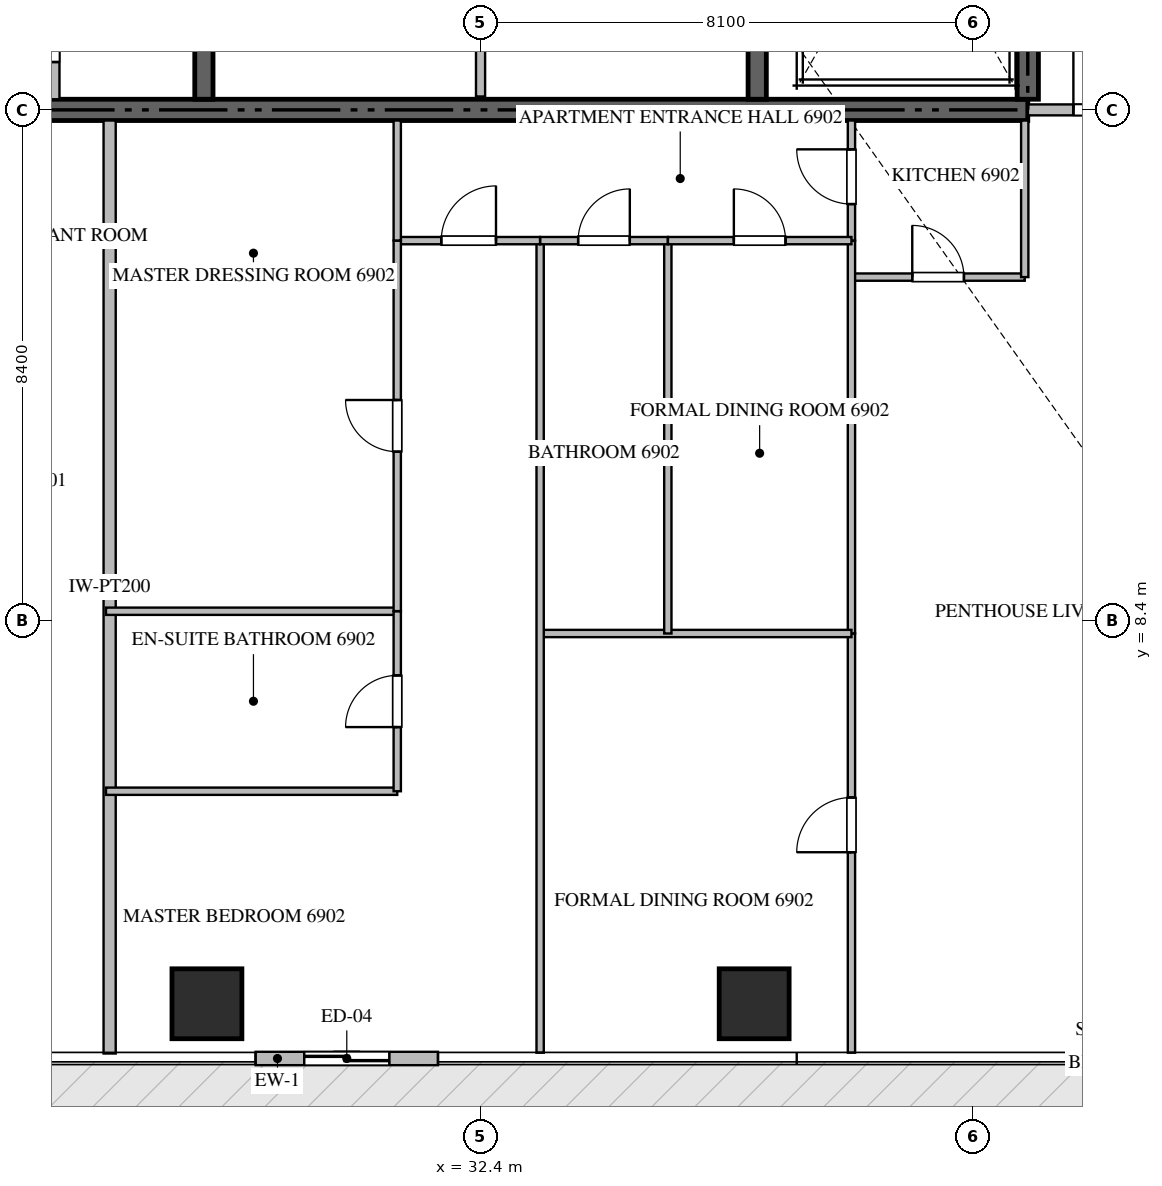
"""IFC4 building model, lengths in metres.
Left out: names, types, materials, properties, quantities, classifications, styles, units other than length and angle.
Written with IfcOpenShell. Run it as: python <this file> out.ifc"""

import sys

from ifc_helpers import new_model, si_unit, direction, frame, frame_2d, origin, origin_2d, place, context, subcontext, project, spatial, rectangle, extrude, source, transform, mapped, element, fill, save


model = new_model("IFC4")
c1 = context("Model", 3, precision=1e-05, world=origin(), true_north=direction((0.0, 1.0)))
c2 = subcontext(c1, "Body", "Model", "MODEL_VIEW")
j1 = project(units=[si_unit("LENGTHUNIT", "METRE"), si_unit("PLANEANGLEUNIT", "RADIAN")], contexts=[c1])
p1 = place(None, origin())
s1 = spatial("IfcSite", under=j1, at=p1, CompositionType="ELEMENT")
p2 = place(p1, origin())
s2 = spatial("IfcBuilding", under=s1, at=p2, CompositionType="ELEMENT")
p3 = place(p2, frame((0.0, 0.0, 275.9)))
s3 = spatial("IfcBuildingStorey", under=s2, at=p3, CompositionType="ELEMENT", Elevation=275.9)
p4 = place(p3, frame((23.4, 16.8, -0.26), z_axis=(0.0, 0.0, 1.0), x_axis=(1.0, 0.0, 0.0)))
e1 = element("IfcWall", 1, at=p4, inside=s3, PredefinedType="SHEAR", context=c2, shape_type="SweptSolid", body=[
    extrude(rectangle(XDim=18.0, YDim=0.35, at=frame_2d((9.0, 0.0))), origin(), (0.0, 0.0, 1.0), 3.848),
])
p5 = place(p3, frame((41.4, 16.975, -0.26), z_axis=(0.0, 0.0, 1.0), x_axis=(0.0, 1.0, 0.0)))
e2 = element("IfcWall", 2, at=p5, inside=s3, PredefinedType="SHEAR", context=c2, shape_type="SweptSolid", body=[
    extrude(rectangle(XDim=8.375, YDim=0.35, at=frame_2d((4.188, 0.0))), origin(), (0.0, 0.0, 1.0), 3.848),
])
p6 = place(p3, frame((27.85, 16.975, -0.26), z_axis=(0.0, 0.0, 1.0), x_axis=(0.0, 1.0, 0.0)))
e3 = element("IfcWall", 3, at=p6, inside=s3, PredefinedType="SHEAR", context=c2, shape_type="SweptSolid", body=[
    extrude(rectangle(XDim=4.875, YDim=0.3, at=frame_2d((2.438, 0.0))), origin(), (0.0, 0.0, 1.0), 3.848),
])
p7 = place(p3, frame((36.95, 16.975, -0.26), z_axis=(0.0, 0.0, 1.0), x_axis=(0.0, 1.0, 0.0)))
e4 = element("IfcWall", 4, at=p7, inside=s3, PredefinedType="SHEAR", context=c2, shape_type="SweptSolid", body=[
    extrude(rectangle(XDim=8.375, YDim=0.3, at=frame_2d((4.188, 0.0))), origin(), (0.0, 0.0, 1.0), 3.848),
])
m1 = source(origin(), c2, "Body", "SweptSolid", [
    extrude(rectangle(XDim=1.15, YDim=1.15, at=origin_2d()), origin(), (0.0, 0.0, 1.0), 3.85),
])
for number, where, z_axis, x_axis in (
    (5, (27.9, 2.1, -0.26), (0.0, 0.0, 1.0), (1.0, 0.0, 0.0)),
    (6, (36.9, 2.1, -0.26), (0.0, 0.0, 1.0), (1.0, 0.0, 0.0)),
):
    element("IfcColumn", number, at=place(p3, frame(where, z_axis=z_axis, x_axis=x_axis)), inside=s3, PredefinedType="COLUMN", context=c2, shape_type="MappedRepresentation", body=[
        mapped(m1, transform((0.0, 0.0, 0.0), scale=1.0)),
    ])
p8 = place(p3, frame((28.7, 1.2, 0.0), z_axis=(0.0, 0.0, 1.0), x_axis=(1.0, 0.0, 0.0)))
e7 = element("IfcWall", 7, at=p8, inside=s3, PredefinedType="ELEMENTEDWALL", context=c2, shape_type="SweptSolid", body=[
    extrude(rectangle(XDim=3.0, YDim=0.22, at=frame_2d((1.5, 0.0))), origin(), (0.0, 0.0, 1.0), 3.575),
])
p9 = place(p8, frame((0.8, 0.0, 0.0)))
e8 = element("IfcOpeningElement", 8, at=p9, cuts=e7, PredefinedType="OPENING", context=c2, shape_type="SweptSolid", body=[
    extrude(rectangle(XDim=1.4, YDim=2.25, at=frame_2d((0.7, 1.125))), frame((0.0, 0.12, 0.0), z_axis=(0.0, -1.0, 0.0), x_axis=(1.0, 0.0, 0.0)), (0.0, 0.0, 1.0), 0.24),
])
p10 = place(p3, frame((25.4, 16.975, 0.0), z_axis=(0.0, 0.0, 1.0), x_axis=(0.0, 1.0, 0.0)))
e9 = element("IfcWall", 9, at=p10, inside=s3, PredefinedType="PARTITIONING", context=c2, shape_type="SweptSolid", body=[
    extrude(rectangle(XDim=2.075, YDim=0.15, at=frame_2d((1.038, 0.0))), origin(), (0.0, 0.0, 1.0), 3.59),
])
p11 = place(p10, frame((0.612, 0.0, 0.0)))
e10 = element("IfcOpeningElement", 10, at=p11, cuts=e9, PredefinedType="OPENING", context=c2, shape_type="SweptSolid", body=[
    extrude(rectangle(XDim=0.85, YDim=2.1, at=frame_2d((0.425, 1.05))), frame((0.0, 0.085, 0.0), z_axis=(0.0, -1.0, 0.0), x_axis=(1.0, 0.0, 0.0)), (0.0, 0.0, 1.0), 0.17),
])
p12 = place(p3, frame((32.4, 17.02, 0.0), z_axis=(0.0, 0.0, 1.0), x_axis=(0.0, 1.0, 0.0)))
e11 = element("IfcWall", 11, at=p12, inside=s3, PredefinedType="PARTITIONING", context=c2, shape_type="SweptSolid", body=[
    extrude(rectangle(XDim=2.73, YDim=0.15, at=frame_2d((1.365, 0.0))), origin(), (0.0, 0.0, 1.0), 3.59),
])
p13 = place(p3, frame((26.3, 1.282, 0.0), z_axis=(0.0, 0.0, 1.0), x_axis=(0.0, 1.0, 0.0)))
e12 = element("IfcWall", 12, at=p13, inside=s3, PredefinedType="PARTITIONING", context=c2, shape_type="SweptSolid", body=[
    extrude(rectangle(XDim=15.343, YDim=0.2, at=frame_2d((7.671, 0.0))), origin(), (0.0, 0.0, 1.0), 3.59),
])
p14 = place(p3, frame((41.402, 16.8, 0.0), z_axis=(0.0, 0.0, 1.0), x_axis=(1.0, 0.0, 0.0)))
e13 = element("IfcWall", 13, at=p14, inside=s3, PredefinedType="PARTITIONING", context=c2, shape_type="SweptSolid", body=[
    extrude(rectangle(XDim=2.496, YDim=0.18, at=frame_2d((1.248, 0.0))), origin(), (0.0, 0.0, 1.0), 3.59),
])
p15 = place(p14, frame((0.748, 0.0, 0.0)))
e14 = element("IfcOpeningElement", 14, at=p15, cuts=e13, PredefinedType="OPENING", context=c2, shape_type="SweptSolid", body=[
    extrude(rectangle(XDim=1.0, YDim=2.15, at=frame_2d((0.5, 1.075))), frame((0.0, 0.1, 0.0), z_axis=(0.0, -1.0, 0.0), x_axis=(1.0, 0.0, 0.0)), (0.0, 0.0, 1.0), 0.2),
])
p16 = place(p3, frame((38.5, 14.05, 0.0), z_axis=(0.0, 0.0, 1.0), x_axis=(1.0, 0.0, 0.0)))
e15 = element("IfcWall", 15, at=p16, inside=s3, PredefinedType="PARTITIONING", context=c2, shape_type="SweptSolid", body=[
    extrude(rectangle(XDim=2.85, YDim=0.12, at=frame_2d((1.425, 0.0))), origin(), (0.0, 0.0, 1.0), 3.59),
])
p17 = place(p16, frame((1.0, 0.0, 0.0)))
e16 = element("IfcOpeningElement", 16, at=p17, cuts=e15, PredefinedType="OPENING", context=c2, shape_type="SweptSolid", body=[
    extrude(rectangle(XDim=0.85, YDim=2.1, at=frame_2d((0.425, 1.05))), frame((0.0, 0.07, 0.0), z_axis=(0.0, -1.0, 0.0), x_axis=(1.0, 0.0, 0.0)), (0.0, 0.0, 1.0), 0.14),
])
p18 = place(p3, frame((41.35, 14.05, 0.0), z_axis=(0.0, 0.0, 1.0), x_axis=(0.0, 1.0, 0.0)))
e17 = element("IfcWall", 17, at=p18, inside=s3, PredefinedType="PARTITIONING", context=c2, shape_type="SweptSolid", body=[
    extrude(rectangle(XDim=2.575, YDim=0.12, at=frame_2d((1.288, 0.0))), origin(), (0.0, 0.0, 1.0), 3.59),
])
p19 = place(p3, frame((38.5, 14.65, 0.0), z_axis=(0.0, 0.0, 1.0), x_axis=(0.0, 1.0, 0.0)))
e18 = element("IfcWall", 18, at=p19, inside=s3, PredefinedType="PARTITIONING", context=c2, shape_type="SweptSolid", body=[
    extrude(rectangle(XDim=1.975, YDim=0.12, at=frame_2d((0.988, 0.0))), origin(), (0.0, 0.0, 1.0), 3.59),
])
p20 = place(p19, frame((0.601, 0.0, 0.0)))
e19 = element("IfcOpeningElement", 19, at=p20, cuts=e18, PredefinedType="OPENING", context=c2, shape_type="SweptSolid", body=[
    extrude(rectangle(XDim=0.9, YDim=2.1, at=frame_2d((0.45, 1.05))), frame((0.0, 0.07, 0.0), z_axis=(0.0, -1.0, 0.0), x_axis=(1.0, 0.0, 0.0)), (0.0, 0.0, 1.0), 0.14),
])
p21 = place(p3, frame((38.5, 1.295, 0.0), z_axis=(0.0, 0.0, 1.0), x_axis=(0.0, 1.0, 0.0)))
e20 = element("IfcWall", 20, at=p21, inside=s3, PredefinedType="PARTITIONING", context=c2, shape_type="SweptSolid", body=[
    extrude(rectangle(XDim=6.894, YDim=0.12, at=frame_2d((3.447, 0.0))), origin(), (0.0, 0.0, 1.0), 3.59),
])
p22 = place(p21, frame((3.297, 0.0, 0.0)))
e21 = element("IfcOpeningElement", 21, at=p22, cuts=e20, PredefinedType="OPENING", context=c2, shape_type="SweptSolid", body=[
    extrude(rectangle(XDim=0.9, YDim=2.1, at=frame_2d((0.45, 1.05))), frame((0.0, 0.07, 0.0), z_axis=(0.0, -1.0, 0.0), x_axis=(1.0, 0.0, 0.0)), (0.0, 0.0, 1.0), 0.14),
])
p23 = place(p3, frame((38.5, 8.191, 0.0), z_axis=(0.0, 0.0, 1.0), x_axis=(0.0, 1.0, 0.0)))
e22 = element("IfcWall", 22, at=p23, inside=s3, PredefinedType="PARTITIONING", context=c2, shape_type="SweptSolid", body=[
    extrude(rectangle(XDim=6.457, YDim=0.12, at=frame_2d((3.229, 0.0))), origin(), (0.0, 0.0, 1.0), 3.59),
])
p24 = place(p3, frame((33.38, 8.189, 0.0), z_axis=(0.0, 0.0, 1.0), x_axis=(1.0, 0.0, 0.0)))
e23 = element("IfcWall", 23, at=p24, inside=s3, PredefinedType="PARTITIONING", context=c2, shape_type="SweptSolid", body=[
    extrude(rectangle(XDim=5.12, YDim=0.12, at=frame_2d((2.56, 0.0))), origin(), (0.0, 0.0, 1.0), 3.59),
])
p25 = place(p3, frame((33.38, 1.295, 0.0), z_axis=(0.0, 0.0, 1.0), x_axis=(0.0, 1.0, 0.0)))
e24 = element("IfcWall", 24, at=p25, inside=s3, PredefinedType="PARTITIONING", context=c2, shape_type="SweptSolid", body=[
    extrude(rectangle(XDim=13.355, YDim=0.12, at=frame_2d((6.677, 0.0))), origin(), (0.0, 0.0, 1.0), 3.59),
])
p26 = place(p3, frame((35.48, 8.189, 0.0), z_axis=(0.0, 0.0, 1.0), x_axis=(0.0, 1.0, 0.0)))
e25 = element("IfcWall", 25, at=p26, inside=s3, PredefinedType="PARTITIONING", context=c2, shape_type="SweptSolid", body=[
    extrude(rectangle(XDim=6.461, YDim=0.12, at=frame_2d((3.23, 0.0))), origin(), (0.0, 0.0, 1.0), 3.59),
])
p27 = place(p3, frame((33.38, 14.65, 0.0), z_axis=(0.0, 0.0, 1.0), x_axis=(1.0, 0.0, 0.0)))
e26 = element("IfcWall", 26, at=p27, inside=s3, PredefinedType="PARTITIONING", context=c2, shape_type="SweptSolid", body=[
    extrude(rectangle(XDim=2.1, YDim=0.12, at=frame_2d((1.05, 0.0))), origin(), (0.0, 0.0, 1.0), 3.59),
])
p28 = place(p27, frame((0.625, 0.0, 0.0)))
e27 = element("IfcOpeningElement", 27, at=p28, cuts=e26, PredefinedType="OPENING", context=c2, shape_type="SweptSolid", body=[
    extrude(rectangle(XDim=0.85, YDim=2.1, at=frame_2d((0.425, 1.05))), frame((0.0, 0.07, 0.0), z_axis=(0.0, -1.0, 0.0), x_axis=(1.0, 0.0, 0.0)), (0.0, 0.0, 1.0), 0.14),
])
p29 = place(p3, frame((35.482, 14.65, 0.0), z_axis=(0.0, 0.0, 1.0), x_axis=(1.0, 0.0, 0.0)))
e28 = element("IfcWall", 28, at=p29, inside=s3, PredefinedType="PARTITIONING", context=c2, shape_type="SweptSolid", body=[
    extrude(rectangle(XDim=3.018, YDim=0.12, at=frame_2d((1.509, 0.0))), origin(), (0.0, 0.0, 1.0), 3.59),
])
p30 = place(p29, frame((1.084, 0.0, 0.0)))
e29 = element("IfcOpeningElement", 29, at=p30, cuts=e28, PredefinedType="OPENING", context=c2, shape_type="SweptSolid", body=[
    extrude(rectangle(XDim=0.85, YDim=2.1, at=frame_2d((0.425, 1.05))), frame((0.0, 0.07, 0.0), z_axis=(0.0, -1.0, 0.0), x_axis=(1.0, 0.0, 0.0)), (0.0, 0.0, 1.0), 0.14),
])
p31 = place(p3, frame((31.03, 14.65, 0.0), z_axis=(0.0, 0.0, 1.0), x_axis=(1.0, 0.0, 0.0)))
e30 = element("IfcWall", 30, at=p31, inside=s3, PredefinedType="PARTITIONING", context=c2, shape_type="SweptSolid", body=[
    extrude(rectangle(XDim=2.348, YDim=0.12, at=frame_2d((1.174, 0.0))), origin(), (0.0, 0.0, 1.0), 3.59),
])
p32 = place(p31, frame((0.724, 0.0, 0.0)))
e31 = element("IfcOpeningElement", 31, at=p32, cuts=e30, PredefinedType="OPENING", context=c2, shape_type="SweptSolid", body=[
    extrude(rectangle(XDim=0.9, YDim=2.1, at=frame_2d((0.45, 1.05))), frame((0.0, 0.07, 0.0), z_axis=(0.0, -1.0, 0.0), x_axis=(1.0, 0.0, 0.0)), (0.0, 0.0, 1.0), 0.14),
])
for number, where, z_axis, x_axis in (
    (32, (26.24, 5.595, 0.0), (0.0, 0.0, 1.0), (1.0, 0.0, 0.0)),
    (33, (26.24, 8.555, 0.0), (0.0, 0.0, 1.0), (1.0, 0.0, 0.0)),
):
    element("IfcWall", number, at=place(p3, frame(where, z_axis=z_axis, x_axis=x_axis)), inside=s3, PredefinedType="PARTITIONING", context=c2, shape_type="SweptSolid", body=[
        extrude(rectangle(XDim=4.79, YDim=0.12, at=frame_2d((2.395, 0.0))), origin(), (0.0, 0.0, 1.0), 3.59),
    ])
p33 = place(p3, frame((31.03, 5.595, 0.0), z_axis=(0.0, 0.0, 1.0), x_axis=(0.0, 1.0, 0.0)))
e34 = element("IfcWall", 34, at=p33, inside=s3, PredefinedType="PARTITIONING", context=c2, shape_type="SweptSolid", body=[
    extrude(rectangle(XDim=2.96, YDim=0.12, at=frame_2d((1.48, 0.0))), origin(), (0.0, 0.0, 1.0), 3.59),
])
p34 = place(p33, frame((1.055, 0.0, 0.0)))
e35 = element("IfcOpeningElement", 35, at=p34, cuts=e34, PredefinedType="OPENING", context=c2, shape_type="SweptSolid", body=[
    extrude(rectangle(XDim=0.85, YDim=2.1, at=frame_2d((0.425, 1.05))), frame((0.0, 0.07, 0.0), z_axis=(0.0, -1.0, 0.0), x_axis=(1.0, 0.0, 0.0)), (0.0, 0.0, 1.0), 0.14),
])
p35 = place(p3, frame((31.03, 8.557, 0.0), z_axis=(0.0, 0.0, 1.0), x_axis=(0.0, 1.0, 0.0)))
e36 = element("IfcWall", 36, at=p35, inside=s3, PredefinedType="PARTITIONING", context=c2, shape_type="SweptSolid", body=[
    extrude(rectangle(XDim=6.093, YDim=0.12, at=frame_2d((3.046, 0.0))), origin(), (0.0, 0.0, 1.0), 3.59),
])
p36 = place(p35, frame((2.622, 0.0, 0.0)))
e37 = element("IfcOpeningElement", 37, at=p36, cuts=e36, PredefinedType="OPENING", context=c2, shape_type="SweptSolid", body=[
    extrude(rectangle(XDim=0.85, YDim=2.1, at=frame_2d((0.425, 1.05))), frame((0.0, 0.07, 0.0), z_axis=(0.0, -1.0, 0.0), x_axis=(1.0, 0.0, 0.0)), (0.0, 0.0, 1.0), 0.14),
])
p37 = place(p3, frame((31.03, 14.652, 0.0), z_axis=(0.0, 0.0, 1.0), x_axis=(0.0, 1.0, 0.0)))
e38 = element("IfcWall", 38, at=p37, inside=s3, PredefinedType="PARTITIONING", context=c2, shape_type="SweptSolid", body=[
    extrude(rectangle(XDim=1.973, YDim=0.12, at=frame_2d((0.986, 0.0))), origin(), (0.0, 0.0, 1.0), 3.59),
])
m2 = source(origin(), c2, "Body", "SweptSolid", [
    extrude(rectangle(XDim=1.4, YDim=2.25, at=frame_2d((0.7, 1.125))), frame((0.0, 0.025, 0.0), z_axis=(0.0, -1.0, 0.0), x_axis=(1.0, 0.0, 0.0)), (0.0, 0.0, 1.0), 0.05),
])
p38 = place(p9, origin())
e39 = element("IfcDoor", 39, at=p38, inside=s3, OperationType="SLIDING_TO_LEFT", PredefinedType="DOOR", context=c2, shape_type="MappedRepresentation", body=[
    mapped(m2, transform((0.0, 0.0, 0.0), scale=1.0)),
])
fill(e8, e39)
m3 = source(origin(), c2, "Body", "SweptSolid", [
    extrude(rectangle(XDim=0.85, YDim=2.1, at=frame_2d((0.425, 1.05))), frame((0.0, 0.025, 0.0), z_axis=(0.0, -1.0, 0.0), x_axis=(1.0, 0.0, 0.0)), (0.0, 0.0, 1.0), 0.05),
])
p39 = place(p11, origin())
e40 = element("IfcDoor", 40, at=p39, inside=s3, OperationType="SINGLE_SWING_RIGHT", PredefinedType="DOOR", context=c2, shape_type="MappedRepresentation", body=[
    mapped(m3, transform((0.0, 0.0, 0.0), scale=1.0)),
])
fill(e10, e40)
m4 = source(origin(), c2, "Body", "SweptSolid", [
    extrude(rectangle(XDim=1.0, YDim=2.15, at=frame_2d((0.5, 1.075))), frame((0.0, 0.025, 0.0), z_axis=(0.0, -1.0, 0.0), x_axis=(1.0, 0.0, 0.0)), (0.0, 0.0, 1.0), 0.05),
])
p40 = place(p15, origin())
e41 = element("IfcDoor", 41, at=p40, inside=s3, OperationType="SINGLE_SWING_LEFT", PredefinedType="DOOR", context=c2, shape_type="MappedRepresentation", body=[
    mapped(m4, transform((0.0, 0.0, 0.0), scale=1.0)),
])
fill(e14, e41)
p41 = place(p17, origin())
e42 = element("IfcDoor", 42, at=p41, inside=s3, OperationType="SINGLE_SWING_LEFT", PredefinedType="DOOR", context=c2, shape_type="MappedRepresentation", body=[
    mapped(m3, transform((0.0, 0.0, 0.0), scale=1.0)),
])
fill(e16, e42)
m5 = source(origin(), c2, "Body", "SweptSolid", [
    extrude(rectangle(XDim=0.9, YDim=2.1, at=frame_2d((0.45, 1.05))), frame((0.0, 0.025, 0.0), z_axis=(0.0, -1.0, 0.0), x_axis=(1.0, 0.0, 0.0)), (0.0, 0.0, 1.0), 0.05),
])
p42 = place(p20, origin())
e43 = element("IfcDoor", 43, at=p42, inside=s3, OperationType="SINGLE_SWING_RIGHT", PredefinedType="DOOR", context=c2, shape_type="MappedRepresentation", body=[
    mapped(m5, transform((0.0, 0.0, 0.0), scale=1.0)),
])
fill(e19, e43)
p43 = place(p22, origin())
e44 = element("IfcDoor", 44, at=p43, inside=s3, OperationType="SINGLE_SWING_LEFT", PredefinedType="DOOR", context=c2, shape_type="MappedRepresentation", body=[
    mapped(m5, transform((0.0, 0.0, 0.0), scale=1.0)),
])
fill(e21, e44)
p44 = place(p28, origin())
e45 = element("IfcDoor", 45, at=p44, inside=s3, OperationType="SINGLE_SWING_RIGHT", PredefinedType="DOOR", context=c2, shape_type="MappedRepresentation", body=[
    mapped(m3, transform((0.0, 0.0, 0.0), scale=1.0)),
])
fill(e27, e45)
p45 = place(p30, origin())
e46 = element("IfcDoor", 46, at=p45, inside=s3, OperationType="SINGLE_SWING_LEFT", PredefinedType="DOOR", context=c2, shape_type="MappedRepresentation", body=[
    mapped(m3, transform((0.0, 0.0, 0.0), scale=1.0)),
])
fill(e29, e46)
p46 = place(p32, origin())
e47 = element("IfcDoor", 47, at=p46, inside=s3, OperationType="SINGLE_SWING_RIGHT", PredefinedType="DOOR", context=c2, shape_type="MappedRepresentation", body=[
    mapped(m5, transform((0.0, 0.0, 0.0), scale=1.0)),
])
fill(e31, e47)
p47 = place(p34, origin())
e48 = element("IfcDoor", 48, at=p47, inside=s3, OperationType="SINGLE_SWING_LEFT", PredefinedType="DOOR", context=c2, shape_type="MappedRepresentation", body=[
    mapped(m3, transform((0.0, 0.0, 0.0), scale=1.0)),
])
fill(e35, e48)
p48 = place(p36, origin())
e49 = element("IfcDoor", 49, at=p48, inside=s3, OperationType="SINGLE_SWING_RIGHT", PredefinedType="DOOR", context=c2, shape_type="MappedRepresentation", body=[
    mapped(m3, transform((0.0, 0.0, 0.0), scale=1.0)),
])
fill(e37, e49)
save(model, sys.argv[1])
